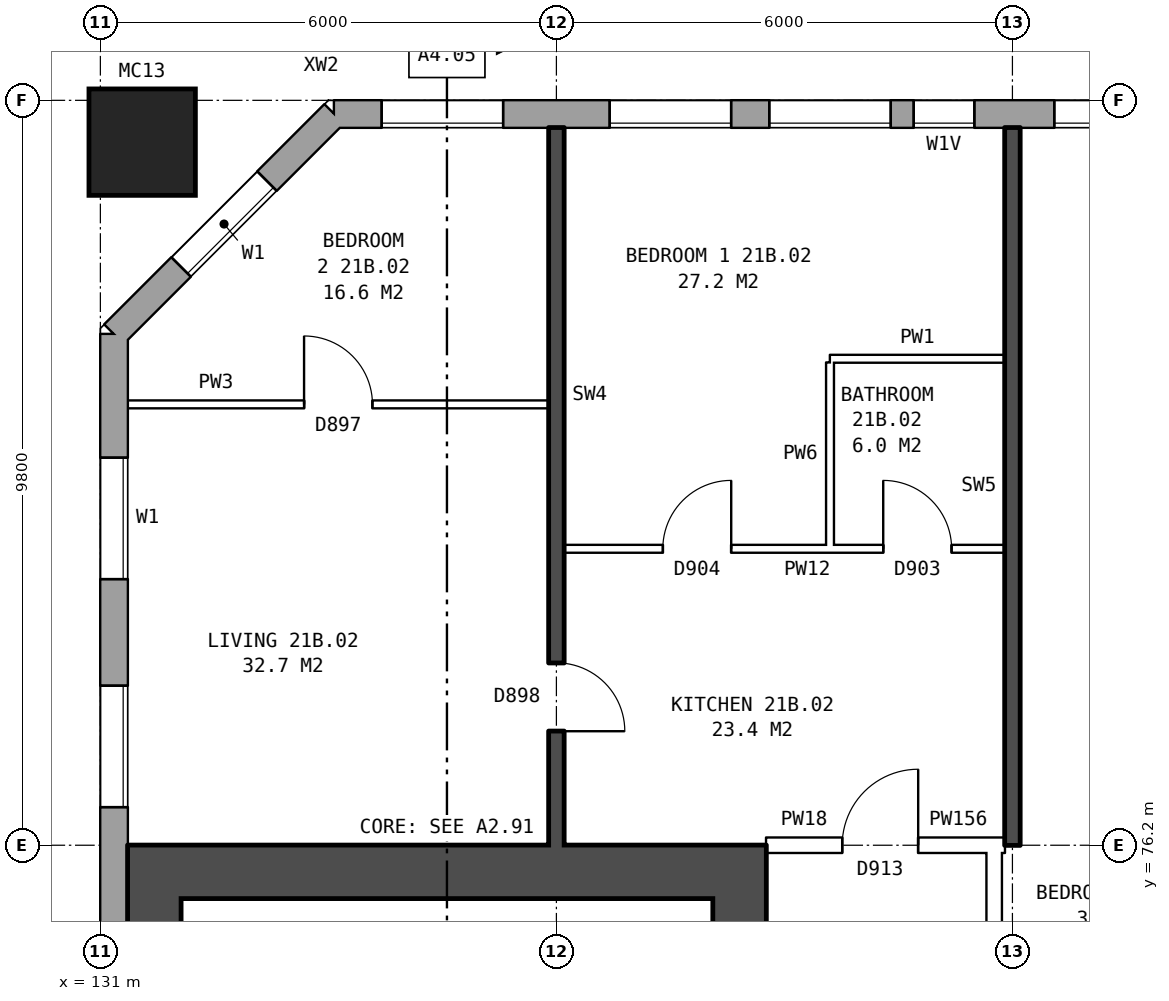
"""IFC4 building model, lengths in metres.
Left out: names, types, materials, properties, quantities, classifications, styles, units other than length and angle.
Written with IfcOpenShell. Run it as: python <this file> out.ifc"""

import sys

from ifc_helpers import new_model, si_unit, direction, frame, frame_2d, origin, origin_2d, place, context, subcontext, project, spatial, rectangle, hollow_rectangle, extrude, element, fill, save


model = new_model("IFC4")
c1 = context("Model", 3, precision=1e-05, world=origin(), true_north=direction((0.0, 1.0)))
c2 = subcontext(c1, "Body", "Model", "MODEL_VIEW")
j1 = project(units=[si_unit("LENGTHUNIT", "METRE"), si_unit("PLANEANGLEUNIT", "RADIAN")], contexts=[c1])
p1 = place(None, origin())
s1 = spatial("IfcSite", under=j1, at=p1, CompositionType="ELEMENT")
p2 = place(p1, origin())
s2 = spatial("IfcBuilding", under=s1, at=p2, CompositionType="ELEMENT")
p3 = place(p2, frame((0.0, 0.0, 77.8)))
s3 = spatial("IfcBuildingStorey", under=s2, at=p3, CompositionType="ELEMENT", Elevation=77.8)
p4 = place(p3, frame((131.55, 85.45, 0.0), z_axis=(0.0, 0.0, 1.0), x_axis=(1.0, 0.0, 0.0)))
e1 = element("IfcColumn", 1, at=p4, inside=s3, PredefinedType="COLUMN", context=c2, shape_type="SweptSolid", body=[
    extrude(hollow_rectangle(XDim=1.4, YDim=1.4, WallThickness=0.075, at=origin_2d()), origin(), (0.0, 0.0, 1.0), 3.1),
])
p5 = place(p3, frame((172.175, 85.82, 0.0), z_axis=(0.0, 0.0, 1.0), x_axis=(-1.0, 0.0, 0.0)))
e2 = element("IfcWall", 2, at=p5, inside=s3, PredefinedType="STANDARD", context=c2, shape_type="SweptSolid", body=[
    extrude(rectangle(XDim=38.101, YDim=0.36, at=frame_2d((19.05, 0.0))), origin(), (0.0, 0.0, 1.0), 2.85),
])
p6 = place(p5, frame((2.875, 0.0, 0.8)))
e3 = element("IfcOpeningElement", 3, at=p6, cuts=e2, PredefinedType="OPENING", context=c2, shape_type="SweptSolid", body=[
    extrude(rectangle(XDim=1.6, YDim=1.8, at=frame_2d((0.8, 0.9))), frame((0.0, 0.19, 0.0), z_axis=(0.0, -1.0, 0.0), x_axis=(1.0, 0.0, 0.0)), (0.0, 0.0, 1.0), 0.38),
])
p7 = place(p5, frame((5.875, 0.0, 0.8)))
e4 = element("IfcOpeningElement", 4, at=p7, cuts=e2, PredefinedType="OPENING", context=c2, shape_type="SweptSolid", body=[
    extrude(rectangle(XDim=1.6, YDim=1.8, at=frame_2d((0.8, 0.9))), frame((0.0, 0.19, 0.0), z_axis=(0.0, -1.0, 0.0), x_axis=(1.0, 0.0, 0.0)), (0.0, 0.0, 1.0), 0.38),
])
p8 = place(p5, frame((7.775, 0.0, 1.7)))
e5 = element("IfcOpeningElement", 5, at=p8, cuts=e2, PredefinedType="OPENING", context=c2, shape_type="SweptSolid", body=[
    extrude(rectangle(XDim=0.6, YDim=0.9, at=frame_2d((0.3, 0.45))), frame((0.0, 0.19, 0.0), z_axis=(0.0, -1.0, 0.0), x_axis=(1.0, 0.0, 0.0)), (0.0, 0.0, 1.0), 0.38),
])
p9 = place(p5, frame((11.875, 0.0, 0.8)))
e6 = element("IfcOpeningElement", 6, at=p9, cuts=e2, PredefinedType="OPENING", context=c2, shape_type="SweptSolid", body=[
    extrude(rectangle(XDim=1.6, YDim=1.8, at=frame_2d((0.8, 0.9))), frame((0.0, 0.19, 0.0), z_axis=(0.0, -1.0, 0.0), x_axis=(1.0, 0.0, 0.0)), (0.0, 0.0, 1.0), 0.38),
])
p10 = place(p5, frame((14.875, 0.0, 0.8)))
e7 = element("IfcOpeningElement", 7, at=p10, cuts=e2, PredefinedType="OPENING", context=c2, shape_type="SweptSolid", body=[
    extrude(rectangle(XDim=1.6, YDim=1.8, at=frame_2d((0.8, 0.9))), frame((0.0, 0.19, 0.0), z_axis=(0.0, -1.0, 0.0), x_axis=(1.0, 0.0, 0.0)), (0.0, 0.0, 1.0), 0.38),
])
p11 = place(p5, frame((17.875, 0.0, 0.8)))
e8 = element("IfcOpeningElement", 8, at=p11, cuts=e2, PredefinedType="OPENING", context=c2, shape_type="SweptSolid", body=[
    extrude(rectangle(XDim=1.6, YDim=1.8, at=frame_2d((0.8, 0.9))), frame((0.0, 0.19, 0.0), z_axis=(0.0, -1.0, 0.0), x_axis=(1.0, 0.0, 0.0)), (0.0, 0.0, 1.0), 0.38),
])
p12 = place(p5, frame((20.875, 0.0, 0.8)))
e9 = element("IfcOpeningElement", 9, at=p12, cuts=e2, PredefinedType="OPENING", context=c2, shape_type="SweptSolid", body=[
    extrude(rectangle(XDim=1.6, YDim=1.8, at=frame_2d((0.8, 0.9))), frame((0.0, 0.19, 0.0), z_axis=(0.0, -1.0, 0.0), x_axis=(1.0, 0.0, 0.0)), (0.0, 0.0, 1.0), 0.38),
])
p13 = place(p5, frame((23.875, 0.0, 0.8)))
e10 = element("IfcOpeningElement", 10, at=p13, cuts=e2, PredefinedType="OPENING", context=c2, shape_type="SweptSolid", body=[
    extrude(rectangle(XDim=1.6, YDim=1.8, at=frame_2d((0.8, 0.9))), frame((0.0, 0.19, 0.0), z_axis=(0.0, -1.0, 0.0), x_axis=(1.0, 0.0, 0.0)), (0.0, 0.0, 1.0), 0.38),
])
p14 = place(p5, frame((26.325, 0.0, 0.65)))
e11 = element("IfcOpeningElement", 11, at=p14, cuts=e2, PredefinedType="OPENING", context=c2, shape_type="SweptSolid", body=[
    extrude(rectangle(XDim=1.4, YDim=1.8, at=frame_2d((0.7, 0.9))), frame((0.0, 0.19, 0.0), z_axis=(0.0, -1.0, 0.0), x_axis=(1.0, 0.0, 0.0)), (0.0, 0.0, 1.0), 0.38),
])
p15 = place(p5, frame((29.675, 0.0, 1.7)))
e12 = element("IfcOpeningElement", 12, at=p15, cuts=e2, PredefinedType="OPENING", context=c2, shape_type="SweptSolid", body=[
    extrude(rectangle(XDim=0.8, YDim=0.9, at=frame_2d((0.4, 0.45))), frame((0.0, 0.19, 0.0), z_axis=(0.0, -1.0, 0.0), x_axis=(1.0, 0.0, 0.0)), (0.0, 0.0, 1.0), 0.38),
])
p16 = place(p5, frame((32.875, 0.0, 0.8)))
e13 = element("IfcOpeningElement", 13, at=p16, cuts=e2, PredefinedType="OPENING", context=c2, shape_type="SweptSolid", body=[
    extrude(rectangle(XDim=1.6, YDim=1.8, at=frame_2d((0.8, 0.9))), frame((0.0, 0.19, 0.0), z_axis=(0.0, -1.0, 0.0), x_axis=(1.0, 0.0, 0.0)), (0.0, 0.0, 1.0), 0.38),
])
p17 = place(p5, frame((35.875, 0.0, 0.8)))
e14 = element("IfcOpeningElement", 14, at=p17, cuts=e2, PredefinedType="OPENING", context=c2, shape_type="SweptSolid", body=[
    extrude(rectangle(XDim=1.6, YDim=1.8, at=frame_2d((0.8, 0.9))), frame((0.0, 0.19, 0.0), z_axis=(0.0, -1.0, 0.0), x_axis=(1.0, 0.0, 0.0)), (0.0, 0.0, 1.0), 0.38),
])
p18 = place(p5, frame((9.575, 0.0, 0.8)))
e15 = element("IfcOpeningElement", 15, at=p18, cuts=e2, PredefinedType="OPENING", context=c2, shape_type="SweptSolid", body=[
    extrude(rectangle(XDim=1.4, YDim=0.9, at=frame_2d((0.7, 0.45))), frame((0.0, 0.19, 0.0), z_axis=(0.0, -1.0, 0.0), x_axis=(1.0, 0.0, 0.0)), (0.0, 0.0, 1.0), 0.38),
])
p19 = place(p5, frame((28.025, 0.0, 0.65)))
e16 = element("IfcOpeningElement", 16, at=p19, cuts=e2, PredefinedType="OPENING", context=c2, shape_type="SweptSolid", body=[
    extrude(rectangle(XDim=0.6, YDim=0.9, at=frame_2d((0.3, 0.45))), frame((0.0, 0.19, 0.0), z_axis=(0.0, -1.0, 0.0), x_axis=(1.0, 0.0, 0.0)), (0.0, 0.0, 1.0), 0.38),
])
p20 = place(p5, frame((30.775, 0.0, 0.8)))
e17 = element("IfcOpeningElement", 17, at=p20, cuts=e2, PredefinedType="OPENING", context=c2, shape_type="SweptSolid", body=[
    extrude(rectangle(XDim=1.6, YDim=1.8, at=frame_2d((0.8, 0.9))), frame((0.0, 0.19, 0.0), z_axis=(0.0, -1.0, 0.0), x_axis=(1.0, 0.0, 0.0)), (0.0, 0.0, 1.0), 0.38),
])
p21 = place(p3, frame((134.075, 85.82, 0.0), z_axis=(0.0, 0.0, 1.0), x_axis=(-0.707106781187, -0.707106781187, 0.0)))
e18 = element("IfcWall", 18, at=p21, inside=s3, PredefinedType="STANDARD", context=c2, shape_type="SweptSolid", body=[
    extrude(rectangle(XDim=4.094, YDim=0.36, at=frame_2d((2.047, 0.0))), origin(), (0.0, 0.0, 1.0), 2.85),
])
p22 = place(p21, frame((1.247, 0.0, 0.8)))
e19 = element("IfcOpeningElement", 19, at=p22, cuts=e18, PredefinedType="OPENING", context=c2, shape_type="SweptSolid", body=[
    extrude(rectangle(XDim=1.6, YDim=1.8, at=frame_2d((0.8, 0.9))), frame((0.0, 0.19, 0.0), z_axis=(0.0, -1.0, 0.0), x_axis=(1.0, 0.0, 0.0)), (0.0, 0.0, 1.0), 0.38),
])
p23 = place(p3, frame((131.18, 82.925, 0.0), z_axis=(0.0, 0.0, 1.0), x_axis=(0.0, -1.0, 0.0)))
e20 = element("IfcWall", 20, at=p23, inside=s3, PredefinedType="STANDARD", context=c2, shape_type="SweptSolid", body=[
    extrude(rectangle(XDim=25.851, YDim=0.36, at=frame_2d((12.925, 0.0))), origin(), (0.0, 0.0, 1.0), 2.85),
])
p24 = place(p23, frame((1.625, 0.0, 0.8)))
e21 = element("IfcOpeningElement", 21, at=p24, cuts=e20, PredefinedType="OPENING", context=c2, shape_type="SweptSolid", body=[
    extrude(rectangle(XDim=1.6, YDim=1.8, at=frame_2d((0.8, 0.9))), frame((0.0, 0.19, 0.0), z_axis=(0.0, -1.0, 0.0), x_axis=(1.0, 0.0, 0.0)), (0.0, 0.0, 1.0), 0.38),
])
p25 = place(p23, frame((4.625, 0.0, 0.8)))
e22 = element("IfcOpeningElement", 22, at=p25, cuts=e20, PredefinedType="OPENING", context=c2, shape_type="SweptSolid", body=[
    extrude(rectangle(XDim=1.6, YDim=1.8, at=frame_2d((0.8, 0.9))), frame((0.0, 0.19, 0.0), z_axis=(0.0, -1.0, 0.0), x_axis=(1.0, 0.0, 0.0)), (0.0, 0.0, 1.0), 0.38),
])
p26 = place(p23, frame((19.625, 0.0, 0.8)))
e23 = element("IfcOpeningElement", 23, at=p26, cuts=e20, PredefinedType="OPENING", context=c2, shape_type="SweptSolid", body=[
    extrude(rectangle(XDim=1.6, YDim=1.8, at=frame_2d((0.8, 0.9))), frame((0.0, 0.19, 0.0), z_axis=(0.0, -1.0, 0.0), x_axis=(1.0, 0.0, 0.0)), (0.0, 0.0, 1.0), 0.38),
])
p27 = place(p23, frame((22.625, 0.0, 0.8)))
e24 = element("IfcOpeningElement", 24, at=p27, cuts=e20, PredefinedType="OPENING", context=c2, shape_type="SweptSolid", body=[
    extrude(rectangle(XDim=1.6, YDim=1.8, at=frame_2d((0.8, 0.9))), frame((0.0, 0.19, 0.0), z_axis=(0.0, -1.0, 0.0), x_axis=(1.0, 0.0, 0.0)), (0.0, 0.0, 1.0), 0.38),
])
p28 = place(p3, frame((139.41, 64.5, 0.0), z_axis=(0.0, 0.0, 1.0), x_axis=(0.0, 1.0, 0.0)))
e25 = element("IfcWall", 25, at=p28, inside=s3, PredefinedType="SHEAR", context=c2, shape_type="SweptSolid", body=[
    extrude(rectangle(XDim=11.0, YDim=0.7, at=frame_2d((5.5, 0.0))), origin(), (0.0, 0.0, 1.0), 2.85),
])
p29 = place(p28, frame((0.625, 0.0, 0.0)))
e26 = element("IfcOpeningElement", 26, at=p29, cuts=e25, PredefinedType="OPENING", context=c2, shape_type="SweptSolid", body=[
    extrude(rectangle(XDim=1.1, YDim=2.1, at=frame_2d((0.55, 1.05))), frame((0.0, 0.36, 0.0), z_axis=(0.0, -1.0, 0.0), x_axis=(1.0, 0.0, 0.0)), (0.0, 0.0, 1.0), 0.72),
])
p30 = place(p28, frame((9.2, 0.0, 0.0)))
e27 = element("IfcOpeningElement", 27, at=p30, cuts=e25, PredefinedType="OPENING", context=c2, shape_type="SweptSolid", body=[
    extrude(rectangle(XDim=1.1, YDim=2.1, at=frame_2d((0.55, 1.05))), frame((0.0, 0.36, 0.0), z_axis=(0.0, -1.0, 0.0), x_axis=(1.0, 0.0, 0.0)), (0.0, 0.0, 1.0), 0.72),
])
p31 = place(p28, frame((7.425, 0.0, 0.0)))
e28 = element("IfcOpeningElement", 28, at=p31, cuts=e25, PredefinedType="OPENING", context=c2, shape_type="SweptSolid", body=[
    extrude(rectangle(XDim=0.85, YDim=2.1, at=frame_2d((0.425, 1.05))), frame((0.0, 0.36, 0.0), z_axis=(0.0, -1.0, 0.0), x_axis=(1.0, 0.0, 0.0)), (0.0, 0.0, 1.0), 0.72),
])
p32 = place(p3, frame((131.71, 64.5, 0.0), z_axis=(0.0, 0.0, 1.0), x_axis=(0.0, 1.0, 0.0)))
e29 = element("IfcWall", 29, at=p32, inside=s3, PredefinedType="SHEAR", context=c2, shape_type="SweptSolid", body=[
    extrude(rectangle(XDim=11.0, YDim=0.7, at=frame_2d((5.5, 0.0))), origin(), (0.0, 0.0, 1.0), 2.85),
])
p33 = place(p3, frame((139.76, 75.85, 0.0), z_axis=(0.0, 0.0, 1.0), x_axis=(-1.0, 0.0, 0.0)))
e30 = element("IfcWall", 30, at=p33, inside=s3, PredefinedType="SHEAR", context=c2, shape_type="SweptSolid", body=[
    extrude(rectangle(XDim=8.4, YDim=0.7, at=frame_2d((4.2, 0.0))), origin(), (0.0, 0.0, 1.0), 2.85),
])
p34 = place(p3, frame((142.76, 63.9, 0.0), z_axis=(0.0, 0.0, 1.0), x_axis=(0.0, 1.0, 0.0)))
e31 = element("IfcWall", 31, at=p34, inside=s3, PredefinedType="PARTITIONING", context=c2, shape_type="SweptSolid", body=[
    extrude(rectangle(XDim=12.2, YDim=0.2, at=frame_2d((6.1, 0.0))), origin(), (0.0, 0.0, 1.0), 2.85),
])
p35 = place(p34, frame((5.1, 0.0, 0.0)))
e32 = element("IfcOpeningElement", 32, at=p35, cuts=e31, PredefinedType="OPENING", context=c2, shape_type="SweptSolid", body=[
    extrude(rectangle(XDim=2.0, YDim=2.1, at=frame_2d((1.0, 1.05))), frame((0.0, 0.11, 0.0), z_axis=(0.0, -1.0, 0.0), x_axis=(1.0, 0.0, 0.0)), (0.0, 0.0, 1.0), 0.22),
])
p36 = place(p3, frame((139.76, 76.2, 0.0), z_axis=(0.0, 0.0, 1.0), x_axis=(1.0, 0.0, 0.0)))
e33 = element("IfcWall", 33, at=p36, inside=s3, PredefinedType="PARTITIONING", context=c2, shape_type="SweptSolid", body=[
    extrude(rectangle(XDim=3.0, YDim=0.2, at=frame_2d((1.5, 0.0))), origin(), (0.0, 0.0, 1.0), 2.85),
])
p37 = place(p36, frame((1.0, 0.0, 0.0)))
e34 = element("IfcOpeningElement", 34, at=p37, cuts=e33, PredefinedType="OPENING", context=c2, shape_type="SweptSolid", body=[
    extrude(rectangle(XDim=1.0, YDim=2.1, at=frame_2d((0.5, 1.05))), frame((0.0, 0.11, 0.0), z_axis=(0.0, -1.0, 0.0), x_axis=(1.0, 0.0, 0.0)), (0.0, 0.0, 1.0), 0.22),
])
p38 = place(p3, frame((142.76, 76.2, 0.0), z_axis=(0.0, 0.0, 1.0), x_axis=(1.0, 0.0, 0.0)))
e35 = element("IfcWall", 35, at=p38, inside=s3, PredefinedType="PARTITIONING", context=c2, shape_type="SweptSolid", body=[
    extrude(rectangle(XDim=0.14, YDim=0.2, at=frame_2d((0.07, 0.0))), origin(), (0.0, 0.0, 1.0), 2.85),
])
p39 = place(p3, frame((137.1, 80.1, 0.0), z_axis=(0.0, 0.0, 1.0), x_axis=(1.0, 0.0, 0.0)))
e36 = element("IfcWall", 36, at=p39, inside=s3, PredefinedType="PARTITIONING", context=c2, shape_type="SweptSolid", body=[
    extrude(rectangle(XDim=5.8, YDim=0.1, at=frame_2d((2.9, 0.0))), origin(), (0.0, 0.0, 1.0), 2.85),
])
p40 = place(p39, frame((1.3, 0.0, 0.0)))
e37 = element("IfcOpeningElement", 37, at=p40, cuts=e36, PredefinedType="OPENING", context=c2, shape_type="SweptSolid", body=[
    extrude(rectangle(XDim=0.9, YDim=2.1, at=frame_2d((0.45, 1.05))), frame((0.0, 0.06, 0.0), z_axis=(0.0, -1.0, 0.0), x_axis=(1.0, 0.0, 0.0)), (0.0, 0.0, 1.0), 0.12),
])
p41 = place(p39, frame((4.2, 0.0, 0.0)))
e38 = element("IfcOpeningElement", 38, at=p41, cuts=e36, PredefinedType="OPENING", context=c2, shape_type="SweptSolid", body=[
    extrude(rectangle(XDim=0.9, YDim=2.1, at=frame_2d((0.45, 1.05))), frame((0.0, 0.06, 0.0), z_axis=(0.0, -1.0, 0.0), x_axis=(1.0, 0.0, 0.0)), (0.0, 0.0, 1.0), 0.12),
])
p42 = place(p3, frame((131.36, 82.0, 0.0), z_axis=(0.0, 0.0, 1.0), x_axis=(1.0, 0.0, 0.0)))
e39 = element("IfcWall", 39, at=p42, inside=s3, PredefinedType="PARTITIONING", context=c2, shape_type="SweptSolid", body=[
    extrude(rectangle(XDim=5.54, YDim=0.1, at=frame_2d((2.77, 0.0))), origin(), (0.0, 0.0, 1.0), 2.85),
])
p43 = place(p42, frame((2.32, 0.0, 0.0)))
e40 = element("IfcOpeningElement", 40, at=p43, cuts=e39, PredefinedType="OPENING", context=c2, shape_type="SweptSolid", body=[
    extrude(rectangle(XDim=0.9, YDim=2.1, at=frame_2d((0.45, 1.05))), frame((0.0, 0.06, 0.0), z_axis=(0.0, -1.0, 0.0), x_axis=(1.0, 0.0, 0.0)), (0.0, 0.0, 1.0), 0.12),
])
p44 = place(p3, frame((140.6, 82.6, 0.0), z_axis=(0.0, 0.0, 1.0), x_axis=(1.0, 0.0, 0.0)))
e41 = element("IfcWall", 41, at=p44, inside=s3, PredefinedType="PARTITIONING", context=c2, shape_type="SweptSolid", body=[
    extrude(rectangle(XDim=2.3, YDim=0.1, at=frame_2d((1.15, 0.0))), origin(), (0.0, 0.0, 1.0), 2.85),
])
p45 = place(p3, frame((137.0, 76.2, 0.0), z_axis=(0.0, 0.0, 1.0), x_axis=(0.0, 1.0, 0.0)))
e42 = element("IfcWall", 42, at=p45, inside=s3, PredefinedType="SOLIDWALL", context=c2, shape_type="SweptSolid", body=[
    extrude(rectangle(XDim=9.44, YDim=0.2, at=frame_2d((4.72, 0.0))), origin(), (0.0, 0.0, 1.0), 2.85),
])
p46 = place(p45, frame((1.5, 0.0, 0.0)))
e43 = element("IfcOpeningElement", 43, at=p46, cuts=e42, PredefinedType="OPENING", context=c2, shape_type="SweptSolid", body=[
    extrude(rectangle(XDim=0.9, YDim=2.1, at=frame_2d((0.45, 1.05))), frame((0.0, 0.11, 0.0), z_axis=(0.0, -1.0, 0.0), x_axis=(1.0, 0.0, 0.0)), (0.0, 0.0, 1.0), 0.22),
])
p47 = place(p3, frame((140.6, 80.15, 0.0), z_axis=(0.0, 0.0, 1.0), x_axis=(0.0, 1.0, 0.0)))
e44 = element("IfcWall", 44, at=p47, inside=s3, PredefinedType="PARTITIONING", context=c2, shape_type="SweptSolid", body=[
    extrude(rectangle(XDim=2.4, YDim=0.1, at=frame_2d((1.2, 0.0))), origin(), (0.0, 0.0, 1.0), 2.85),
])
p48 = place(p3, frame((143.0, 76.2, 0.0), z_axis=(0.0, 0.0, 1.0), x_axis=(0.0, 1.0, 0.0)))
e45 = element("IfcWall", 45, at=p48, inside=s3, PredefinedType="SOLIDWALL", context=c2, shape_type="SweptSolid", body=[
    extrude(rectangle(XDim=9.44, YDim=0.2, at=frame_2d((4.72, 0.0))), origin(), (0.0, 0.0, 1.0), 2.85),
])
p49 = place(p15, origin())
e46 = element("IfcWindow", 46, at=p49, inside=s3, PartitioningType="SINGLE_PANEL", PredefinedType="WINDOW", context=c2, shape_type="SweptSolid", body=[
    extrude(rectangle(XDim=0.8, YDim=0.9, at=frame_2d((0.4, 0.45))), frame((0.0, 0.15, 0.0), z_axis=(0.0, -1.0, 0.0), x_axis=(1.0, 0.0, 0.0)), (0.0, 0.0, 1.0), 0.06),
])
fill(e12, e46)
p50 = place(p16, origin())
e47 = element("IfcWindow", 47, at=p50, inside=s3, PartitioningType="SINGLE_PANEL", PredefinedType="WINDOW", context=c2, shape_type="SweptSolid", body=[
    extrude(rectangle(XDim=1.6, YDim=1.8, at=frame_2d((0.8, 0.9))), frame((0.0, 0.15, 0.0), z_axis=(0.0, -1.0, 0.0), x_axis=(1.0, 0.0, 0.0)), (0.0, 0.0, 1.0), 0.06),
])
fill(e13, e47)
p51 = place(p17, origin())
e48 = element("IfcWindow", 48, at=p51, inside=s3, PartitioningType="SINGLE_PANEL", PredefinedType="WINDOW", context=c2, shape_type="SweptSolid", body=[
    extrude(rectangle(XDim=1.6, YDim=1.8, at=frame_2d((0.8, 0.9))), frame((0.0, 0.15, 0.0), z_axis=(0.0, -1.0, 0.0), x_axis=(1.0, 0.0, 0.0)), (0.0, 0.0, 1.0), 0.06),
])
fill(e14, e48)
p52 = place(p22, origin())
e49 = element("IfcWindow", 49, at=p52, inside=s3, PartitioningType="SINGLE_PANEL", PredefinedType="WINDOW", context=c2, shape_type="SweptSolid", body=[
    extrude(rectangle(XDim=1.6, YDim=1.8, at=frame_2d((0.8, 0.9))), frame((0.0, 0.15, 0.0), z_axis=(0.0, -1.0, 0.0), x_axis=(1.0, 0.0, 0.0)), (0.0, 0.0, 1.0), 0.06),
])
fill(e19, e49)
p53 = place(p24, origin())
e50 = element("IfcWindow", 50, at=p53, inside=s3, PartitioningType="SINGLE_PANEL", PredefinedType="WINDOW", context=c2, shape_type="SweptSolid", body=[
    extrude(rectangle(XDim=1.6, YDim=1.8, at=frame_2d((0.8, 0.9))), frame((0.0, 0.15, 0.0), z_axis=(0.0, -1.0, 0.0), x_axis=(1.0, 0.0, 0.0)), (0.0, 0.0, 1.0), 0.06),
])
fill(e21, e50)
p54 = place(p25, origin())
e51 = element("IfcWindow", 51, at=p54, inside=s3, PartitioningType="SINGLE_PANEL", PredefinedType="WINDOW", context=c2, shape_type="SweptSolid", body=[
    extrude(rectangle(XDim=1.6, YDim=1.8, at=frame_2d((0.8, 0.9))), frame((0.0, 0.15, 0.0), z_axis=(0.0, -1.0, 0.0), x_axis=(1.0, 0.0, 0.0)), (0.0, 0.0, 1.0), 0.06),
])
fill(e22, e51)
p55 = place(p40, origin())
e52 = element("IfcDoor", 52, at=p55, inside=s3, OperationType="SINGLE_SWING_RIGHT", PredefinedType="DOOR", context=c2, shape_type="SweptSolid", body=[
    extrude(rectangle(XDim=0.9, YDim=2.1, at=frame_2d((0.45, 1.05))), frame((0.0, 0.025, 0.0), z_axis=(0.0, -1.0, 0.0), x_axis=(1.0, 0.0, 0.0)), (0.0, 0.0, 1.0), 0.05),
])
fill(e37, e52)
p56 = place(p43, origin())
e53 = element("IfcDoor", 53, at=p56, inside=s3, OperationType="SINGLE_SWING_LEFT", PredefinedType="DOOR", context=c2, shape_type="SweptSolid", body=[
    extrude(rectangle(XDim=0.9, YDim=2.1, at=frame_2d((0.45, 1.05))), frame((0.0, 0.025, 0.0), z_axis=(0.0, -1.0, 0.0), x_axis=(1.0, 0.0, 0.0)), (0.0, 0.0, 1.0), 0.05),
])
fill(e40, e53)
p57 = place(p37, origin())
e54 = element("IfcDoor", 54, at=p57, inside=s3, OperationType="SINGLE_SWING_RIGHT", PredefinedType="DOOR", context=c2, shape_type="SweptSolid", body=[
    extrude(rectangle(XDim=1.0, YDim=2.1, at=frame_2d((0.5, 1.05))), frame((0.0, 0.025, 0.0), z_axis=(0.0, -1.0, 0.0), x_axis=(1.0, 0.0, 0.0)), (0.0, 0.0, 1.0), 0.05),
])
fill(e34, e54)
p58 = place(p46, frame((0.9, 0.0, 0.0), z_axis=(0.0, 0.0, 1.0), x_axis=(-1.0, 0.0, 0.0)))
e55 = element("IfcDoor", 55, at=p58, inside=s3, OperationType="SINGLE_SWING_RIGHT", PredefinedType="DOOR", context=c2, shape_type="SweptSolid", body=[
    extrude(rectangle(XDim=0.9, YDim=2.1, at=frame_2d((0.45, 1.05))), frame((0.0, 0.025, 0.0), z_axis=(0.0, -1.0, 0.0), x_axis=(1.0, 0.0, 0.0)), (0.0, 0.0, 1.0), 0.05),
])
fill(e43, e55)
p59 = place(p41, origin())
e56 = element("IfcDoor", 56, at=p59, inside=s3, OperationType="SINGLE_SWING_LEFT", PredefinedType="DOOR", context=c2, shape_type="SweptSolid", body=[
    extrude(rectangle(XDim=0.9, YDim=2.1, at=frame_2d((0.45, 1.05))), frame((0.0, 0.025, 0.0), z_axis=(0.0, -1.0, 0.0), x_axis=(1.0, 0.0, 0.0)), (0.0, 0.0, 1.0), 0.05),
])
fill(e38, e56)
p60 = place(p19, origin())
e57 = element("IfcWindow", 57, at=p60, inside=s3, PartitioningType="SINGLE_PANEL", PredefinedType="WINDOW", context=c2, shape_type="SweptSolid", body=[
    extrude(rectangle(XDim=0.6, YDim=0.9, at=frame_2d((0.3, 0.45))), frame((0.0, 0.15, 0.0), z_axis=(0.0, -1.0, 0.0), x_axis=(1.0, 0.0, 0.0)), (0.0, 0.0, 1.0), 0.06),
])
fill(e16, e57)
p61 = place(p20, origin())
e58 = element("IfcWindow", 58, at=p61, inside=s3, PartitioningType="SINGLE_PANEL", PredefinedType="WINDOW", context=c2, shape_type="SweptSolid", body=[
    extrude(rectangle(XDim=1.6, YDim=1.8, at=frame_2d((0.8, 0.9))), frame((0.0, 0.15, 0.0), z_axis=(0.0, -1.0, 0.0), x_axis=(1.0, 0.0, 0.0)), (0.0, 0.0, 1.0), 0.06),
])
fill(e17, e58)
save(model, sys.argv[1])
